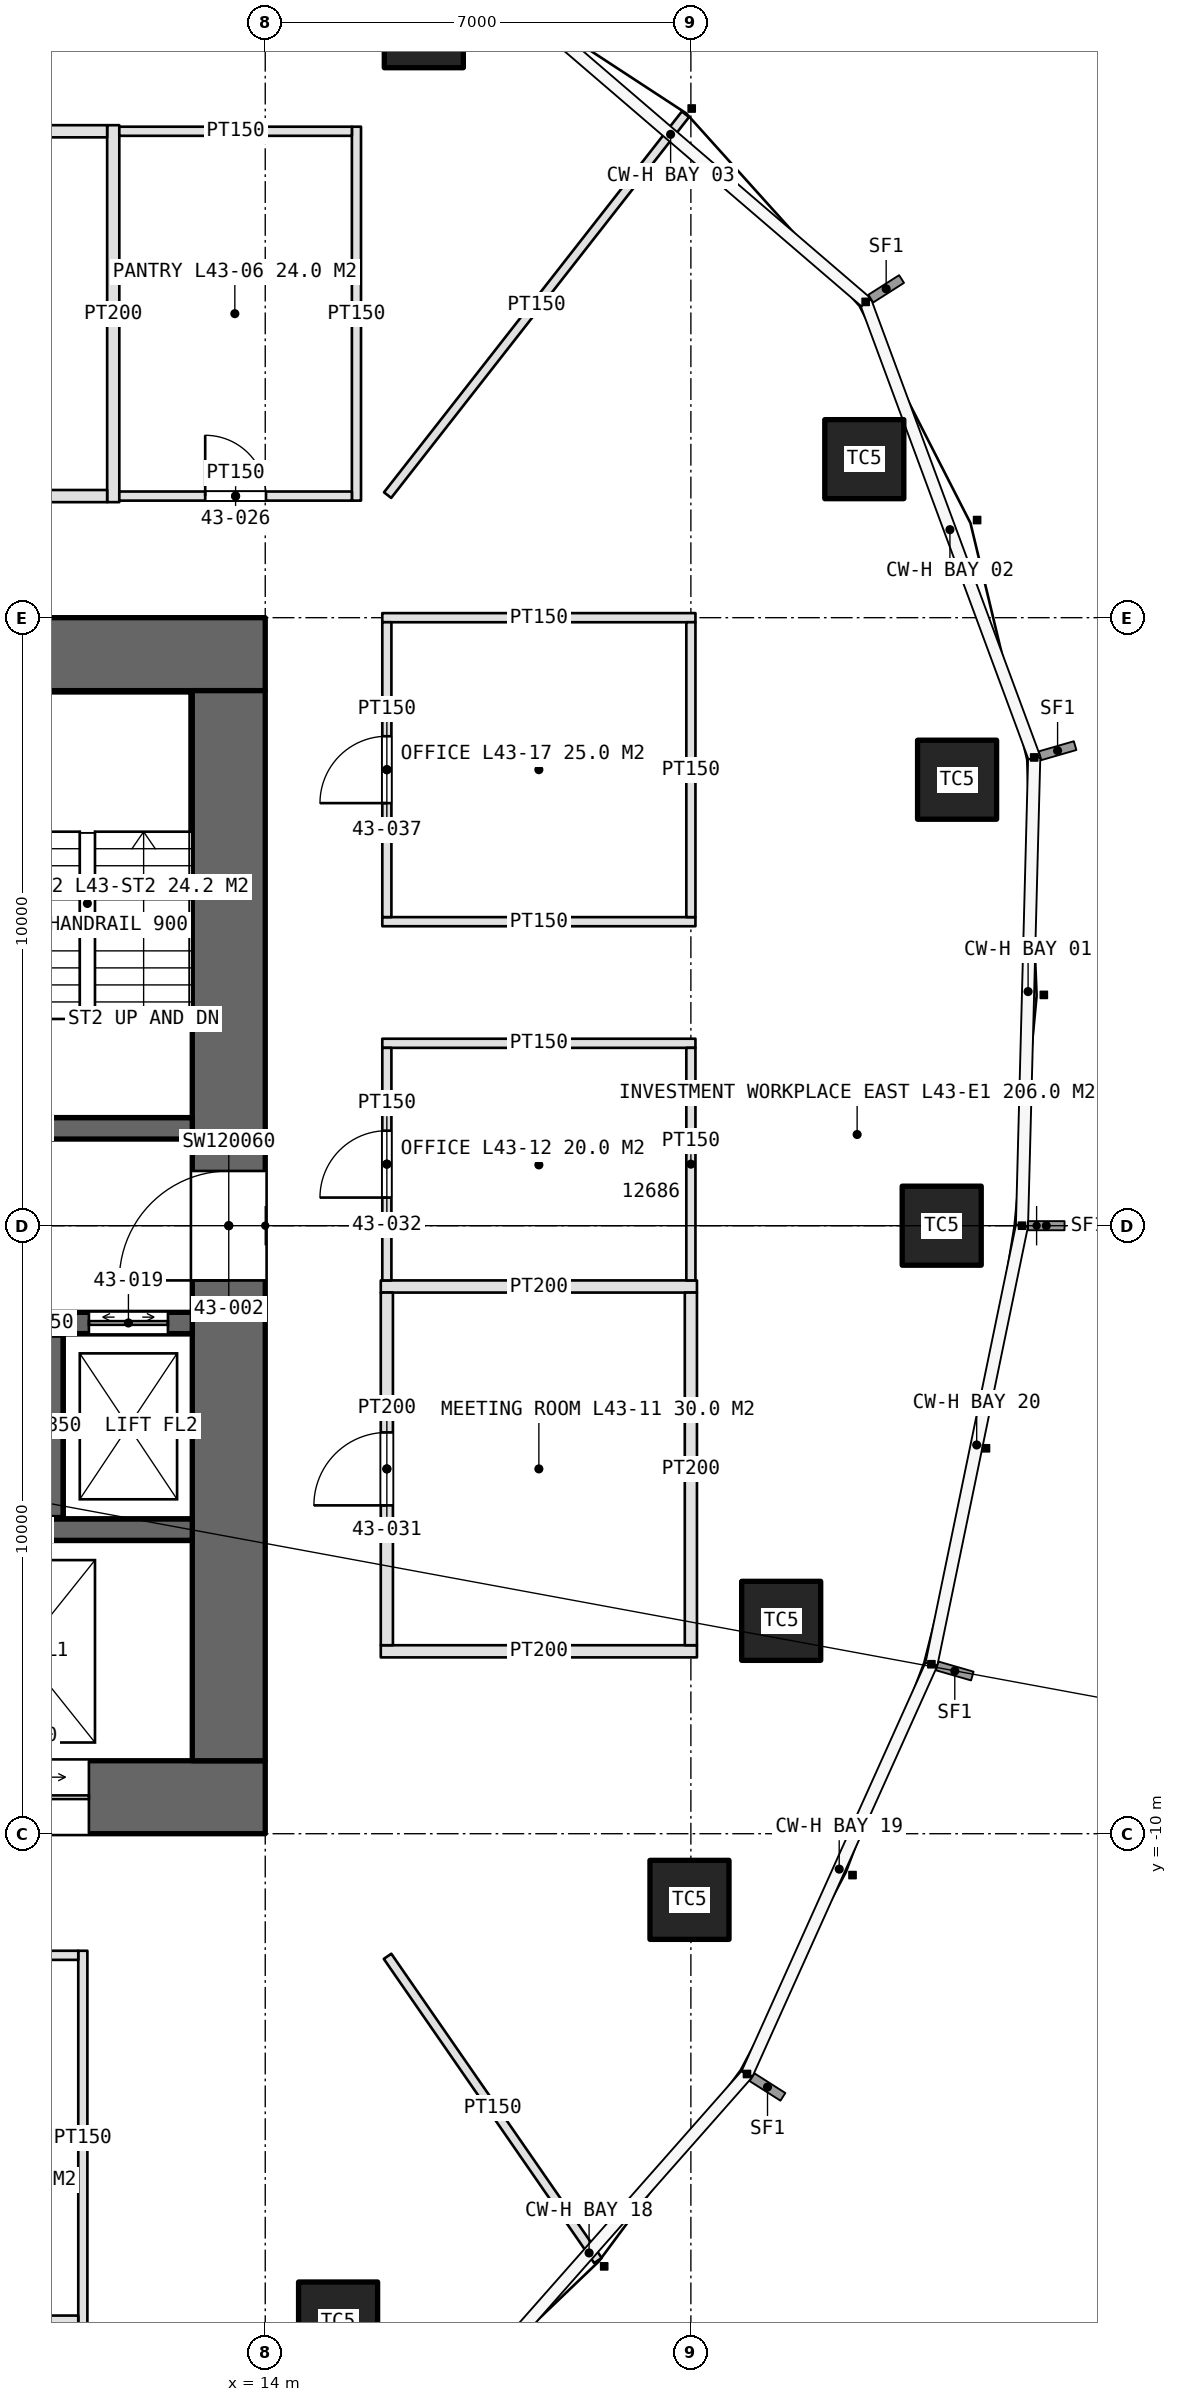
"""IFC4 building model, lengths in metres.
Left out: names, types, materials, properties, quantities, classifications, styles, units other than length and angle.
Written with IfcOpenShell. Run it as: python <this file> out.ifc"""

import sys

from ifc_helpers import new_model, si_unit, direction, frame, frame_2d, origin, origin_2d, place, context, subcontext, project, spatial, rectangle, extrude, element, fill, save


model = new_model("IFC4")
c1 = context("Model", 3, precision=1e-05, world=origin(), true_north=direction((0.0, 1.0)))
c2 = subcontext(c1, "Body", "Model", "MODEL_VIEW")
j1 = project(units=[si_unit("LENGTHUNIT", "METRE"), si_unit("PLANEANGLEUNIT", "RADIAN")], contexts=[c1])
p1 = place(None, origin())
s1 = spatial("IfcSite", under=j1, at=p1, CompositionType="ELEMENT")
p2 = place(p1, origin())
s2 = spatial("IfcBuilding", under=s1, at=p2, CompositionType="ELEMENT")
p3 = place(p2, frame((0.0, 0.0, 199.0)))
s3 = spatial("IfcBuildingStorey", under=s2, at=p3, CompositionType="ELEMENT", Elevation=199.0)
p4 = place(p3, frame((-14.0, -9.4, 0.0), z_axis=(0.0, 0.0, 1.0), x_axis=(1.0, 0.0, 0.0)))
e1 = element("IfcWall", 1, at=p4, inside=s3, PredefinedType="SHEAR", context=c2, shape_type="SweptSolid", body=[
    extrude(rectangle(XDim=28.0, YDim=1.2, at=frame_2d((14.0, 0.0))), origin(), (0.0, 0.0, 1.0), 4.2),
])
p5 = place(p4, frame((22.9, 0.0, 0.0)))
e2 = element("IfcOpeningElement", 2, at=p5, cuts=e1, PredefinedType="OPENING", context=c2, shape_type="SweptSolid", body=[
    extrude(rectangle(XDim=2.2, YDim=2.7, at=frame_2d((1.1, 1.35))), frame((0.0, 0.61, 0.0), z_axis=(0.0, -1.0, 0.0), x_axis=(1.0, 0.0, 0.0)), (0.0, 0.0, 1.0), 1.22),
])
p6 = place(p3, frame((14.0, 9.4, 0.0), z_axis=(0.0, 0.0, 1.0), x_axis=(-1.0, 0.0, 0.0)))
e3 = element("IfcWall", 3, at=p6, inside=s3, PredefinedType="SHEAR", context=c2, shape_type="SweptSolid", body=[
    extrude(rectangle(XDim=28.0, YDim=1.2, at=frame_2d((14.0, 0.0))), origin(), (0.0, 0.0, 1.0), 4.2),
])
p7 = place(p6, frame((24.0, 0.0, 0.0)))
e4 = element("IfcOpeningElement", 4, at=p7, cuts=e3, PredefinedType="OPENING", context=c2, shape_type="SweptSolid", body=[
    extrude(rectangle(XDim=1.0, YDim=2.4, at=frame_2d((0.5, 1.2))), frame((0.0, 0.61, 0.0), z_axis=(0.0, -1.0, 0.0), x_axis=(1.0, 0.0, 0.0)), (0.0, 0.0, 1.0), 1.22),
])
p8 = place(p3, frame((13.4, -8.8, 0.0), z_axis=(0.0, 0.0, 1.0), x_axis=(0.0, 1.0, 0.0)))
e5 = element("IfcWall", 5, at=p8, inside=s3, PredefinedType="SHEAR", context=c2, shape_type="SweptSolid", body=[
    extrude(rectangle(XDim=17.6, YDim=1.2, at=frame_2d((8.8, 0.0))), origin(), (0.0, 0.0, 1.0), 4.2),
])
p9 = place(p8, frame((7.9, 0.0, 0.0)))
e6 = element("IfcOpeningElement", 6, at=p9, cuts=e5, PredefinedType="OPENING", context=c2, shape_type="SweptSolid", body=[
    extrude(rectangle(XDim=1.8, YDim=2.4, at=frame_2d((0.9, 1.2))), frame((0.0, 0.61, 0.0), z_axis=(0.0, -1.0, 0.0), x_axis=(1.0, 0.0, 0.0)), (0.0, 0.0, 1.0), 1.22),
])
p10 = place(p3, frame((7.2, 1.6, 0.0), z_axis=(0.0, 0.0, 1.0), x_axis=(1.0, 0.0, 0.0)))
e7 = element("IfcWall", 7, at=p10, inside=s3, PredefinedType="SHEAR", context=c2, shape_type="SweptSolid", body=[
    extrude(rectangle(XDim=5.6, YDim=0.35, at=frame_2d((2.8, 0.0))), origin(), (0.0, 0.0, 1.0), 4.2),
])
p11 = place(p10, frame((0.6, 0.0, 0.0)))
e8 = element("IfcOpeningElement", 8, at=p11, cuts=e7, PredefinedType="OPENING", context=c2, shape_type="SweptSolid", body=[
    extrude(rectangle(XDim=1.0, YDim=2.4, at=frame_2d((0.5, 1.2))), frame((0.0, 0.185, 0.0), z_axis=(0.0, -1.0, 0.0), x_axis=(1.0, 0.0, 0.0)), (0.0, 0.0, 1.0), 0.37),
])
p12 = place(p3, frame((7.2, -1.6, 0.0), z_axis=(0.0, 0.0, 1.0), x_axis=(1.0, 0.0, 0.0)))
e9 = element("IfcWall", 9, at=p12, inside=s3, PredefinedType="SHEAR", context=c2, shape_type="SweptSolid", body=[
    extrude(rectangle(XDim=5.6, YDim=0.35, at=frame_2d((2.8, 0.0))), origin(), (0.0, 0.0, 1.0), 4.2),
])
p13 = place(p12, frame((0.9, 0.0, 0.0)))
e10 = element("IfcOpeningElement", 10, at=p13, cuts=e9, PredefinedType="OPENING", context=c2, shape_type="SweptSolid", body=[
    extrude(rectangle(XDim=1.3, YDim=2.4, at=frame_2d((0.65, 1.2))), frame((0.0, 0.185, 0.0), z_axis=(0.0, -1.0, 0.0), x_axis=(1.0, 0.0, 0.0)), (0.0, 0.0, 1.0), 0.37),
])
p14 = place(p12, frame((3.9, 0.0, 0.0)))
e11 = element("IfcOpeningElement", 11, at=p14, cuts=e9, PredefinedType="OPENING", context=c2, shape_type="SweptSolid", body=[
    extrude(rectangle(XDim=1.3, YDim=2.4, at=frame_2d((0.65, 1.2))), frame((0.0, 0.185, 0.0), z_axis=(0.0, -1.0, 0.0), x_axis=(1.0, 0.0, 0.0)), (0.0, 0.0, 1.0), 0.37),
])
p15 = place(p3, frame((10.5, -4.8, 0.0), z_axis=(0.0, 0.0, 1.0), x_axis=(0.0, 1.0, 0.0)))
e12 = element("IfcWall", 12, at=p15, inside=s3, PredefinedType="SHEAR", context=c2, shape_type="SweptSolid", body=[
    extrude(rectangle(XDim=3.0, YDim=0.35, at=frame_2d((1.5, 0.0))), origin(), (0.0, 0.0, 1.0), 4.2),
])
p16 = place(p3, frame((7.2, -5.0, 0.0), z_axis=(0.0, 0.0, 1.0), x_axis=(1.0, 0.0, 0.0)))
e13 = element("IfcWall", 13, at=p16, inside=s3, PredefinedType="SHEAR", context=c2, shape_type="SweptSolid", body=[
    extrude(rectangle(XDim=5.6, YDim=0.35, at=frame_2d((2.8, 0.0))), origin(), (0.0, 0.0, 1.0), 4.2),
])
for number, where, z_axis, x_axis in (
    (14, (25.125, 0.0, 0.0), (0.0, 0.0, 1.0), (1.0, 0.0, 0.0)),
    (15, (25.378, 7.335, 0.0), (0.0, 0.0, 1.0), (1.0, 0.0, 0.0)),
    (16, (23.852, 12.607, 0.0), (0.0, 0.0, 1.0), (1.0, 0.0, 0.0)),
    (17, (16.608, 19.695, 0.0), (0.0, 0.0, 1.0), (1.0, 0.0, 0.0)),
    (18, (15.198, -18.023, 0.0), (0.0, 0.0, 1.0), (1.0, 0.0, 0.0)),
    (19, (20.977, -11.088, 0.0), (0.0, 0.0, 1.0), (1.0, 0.0, 0.0)),
    (20, (22.485, -6.499, 0.0), (0.0, 0.0, 1.0), (1.0, 0.0, 0.0)),
):
    element("IfcColumn", number, at=place(p3, frame(where, z_axis=z_axis, x_axis=x_axis)), inside=s3, PredefinedType="COLUMN", context=c2, shape_type="SweptSolid", body=[
        extrude(rectangle(XDim=1.3, YDim=1.3, at=origin_2d()), origin(), (0.0, 0.0, 1.0), 4.2),
    ])
p17 = place(p3, frame((11.5, 11.9, 0.0), z_axis=(0.0, 0.0, 1.0), x_axis=(0.0, 1.0, 0.0)))
e21 = element("IfcWall", 21, at=p17, inside=s3, PredefinedType="PARTITIONING", context=c2, shape_type="SweptSolid", body=[
    extrude(rectangle(XDim=6.2, YDim=0.2, at=frame_2d((3.1, 0.0))), origin(), (0.0, 0.0, 1.0), 3.0),
])
p18 = place(p3, frame((15.5, 11.925, 0.0), z_axis=(0.0, 0.0, 1.0), x_axis=(0.0, 1.0, 0.0)))
e22 = element("IfcWall", 22, at=p18, inside=s3, PredefinedType="PARTITIONING", context=c2, shape_type="SweptSolid", body=[
    extrude(rectangle(XDim=6.15, YDim=0.15, at=frame_2d((3.075, 0.0))), origin(), (0.0, 0.0, 1.0), 3.0),
])
p19 = place(p3, frame((2.6, 12.0, 0.0), z_axis=(0.0, 0.0, 1.0), x_axis=(1.0, 0.0, 0.0)))
e23 = element("IfcWall", 23, at=p19, inside=s3, PredefinedType="PARTITIONING", context=c2, shape_type="SweptSolid", body=[
    extrude(rectangle(XDim=8.8, YDim=0.2, at=frame_2d((4.4, 0.0))), origin(), (0.0, 0.0, 1.0), 3.0),
])
p20 = place(p19, frame((3.8, 0.0, 0.0)))
e24 = element("IfcOpeningElement", 24, at=p20, cuts=e23, PredefinedType="OPENING", context=c2, shape_type="SweptSolid", body=[
    extrude(rectangle(XDim=1.2, YDim=2.4, at=frame_2d((0.6, 1.2))), frame((0.0, 0.11, 0.0), z_axis=(0.0, -1.0, 0.0), x_axis=(1.0, 0.0, 0.0)), (0.0, 0.0, 1.0), 0.22),
])
p21 = place(p3, frame((2.6, 18.0, 0.0), z_axis=(0.0, 0.0, 1.0), x_axis=(1.0, 0.0, 0.0)))
e25 = element("IfcWall", 25, at=p21, inside=s3, PredefinedType="PARTITIONING", context=c2, shape_type="SweptSolid", body=[
    extrude(rectangle(XDim=8.8, YDim=0.2, at=frame_2d((4.4, 0.0))), origin(), (0.0, 0.0, 1.0), 3.0),
])
p22 = place(p3, frame((11.6, 12.0, 0.0), z_axis=(0.0, 0.0, 1.0), x_axis=(1.0, 0.0, 0.0)))
e26 = element("IfcWall", 26, at=p22, inside=s3, PredefinedType="PARTITIONING", context=c2, shape_type="SweptSolid", body=[
    extrude(rectangle(XDim=3.825, YDim=0.15, at=frame_2d((1.913, 0.0))), origin(), (0.0, 0.0, 1.0), 3.0),
])
p23 = place(p22, frame((1.413, 0.0, 0.0)))
e27 = element("IfcOpeningElement", 27, at=p23, cuts=e26, PredefinedType="OPENING", context=c2, shape_type="SweptSolid", body=[
    extrude(rectangle(XDim=1.0, YDim=2.2, at=frame_2d((0.5, 1.1))), frame((0.0, 0.085, 0.0), z_axis=(0.0, -1.0, 0.0), x_axis=(1.0, 0.0, 0.0)), (0.0, 0.0, 1.0), 0.17),
])
p24 = place(p3, frame((11.6, 18.0, 0.0), z_axis=(0.0, 0.0, 1.0), x_axis=(1.0, 0.0, 0.0)))
e28 = element("IfcWall", 28, at=p24, inside=s3, PredefinedType="PARTITIONING", context=c2, shape_type="SweptSolid", body=[
    extrude(rectangle(XDim=3.825, YDim=0.15, at=frame_2d((1.913, 0.0))), origin(), (0.0, 0.0, 1.0), 3.0),
])
p25 = place(p3, frame((11.0, -11.925, 0.0), z_axis=(0.0, 0.0, 1.0), x_axis=(0.0, -1.0, 0.0)))
e29 = element("IfcWall", 29, at=p25, inside=s3, PredefinedType="PARTITIONING", context=c2, shape_type="SweptSolid", body=[
    extrude(rectangle(XDim=6.15, YDim=0.15, at=frame_2d((3.075, 0.0))), origin(), (0.0, 0.0, 1.0), 3.0),
])
p26 = place(p3, frame((6.075, -12.0, 0.0), z_axis=(0.0, 0.0, 1.0), x_axis=(1.0, 0.0, 0.0)))
e30 = element("IfcWall", 30, at=p26, inside=s3, PredefinedType="PARTITIONING", context=c2, shape_type="SweptSolid", body=[
    extrude(rectangle(XDim=4.85, YDim=0.15, at=frame_2d((2.425, 0.0))), origin(), (0.0, 0.0, 1.0), 3.0),
])
p27 = place(p26, frame((1.925, 0.0, 0.0)))
e31 = element("IfcOpeningElement", 31, at=p27, cuts=e30, PredefinedType="OPENING", context=c2, shape_type="SweptSolid", body=[
    extrude(rectangle(XDim=1.0, YDim=2.2, at=frame_2d((0.5, 1.1))), frame((0.0, 0.085, 0.0), z_axis=(0.0, -1.0, 0.0), x_axis=(1.0, 0.0, 0.0)), (0.0, 0.0, 1.0), 0.17),
])
p28 = place(p3, frame((6.075, -18.0, 0.0), z_axis=(0.0, 0.0, 1.0), x_axis=(1.0, 0.0, 0.0)))
e32 = element("IfcWall", 32, at=p28, inside=s3, PredefinedType="PARTITIONING", context=c2, shape_type="SweptSolid", body=[
    extrude(rectangle(XDim=4.85, YDim=0.15, at=frame_2d((2.425, 0.0))), origin(), (0.0, 0.0, 1.0), 3.0),
])
for number, where, z_axis, x_axis in (
    (33, (15.9, -7.0, 0.0), (0.0, 0.0, 1.0), (1.0, 0.0, 0.0)),
    (34, (15.9, -1.0, 0.0), (0.0, 0.0, 1.0), (1.0, 0.0, 0.0)),
):
    element("IfcWall", number, at=place(p3, frame(where, z_axis=z_axis, x_axis=x_axis)), inside=s3, PredefinedType="PARTITIONING", context=c2, shape_type="SweptSolid", body=[
        extrude(rectangle(XDim=5.2, YDim=0.2, at=frame_2d((2.6, 0.0))), origin(), (0.0, 0.0, 1.0), 3.0),
    ])
p29 = place(p3, frame((15.925, 3.0, 0.0), z_axis=(0.0, 0.0, 1.0), x_axis=(1.0, 0.0, 0.0)))
e35 = element("IfcWall", 35, at=p29, inside=s3, PredefinedType="PARTITIONING", context=c2, shape_type="SweptSolid", body=[
    extrude(rectangle(XDim=5.15, YDim=0.15, at=frame_2d((2.575, 0.0))), origin(), (0.0, 0.0, 1.0), 3.0),
])
p30 = place(p3, frame((16.0, -6.9, 0.0), z_axis=(0.0, 0.0, 1.0), x_axis=(0.0, 1.0, 0.0)))
e36 = element("IfcWall", 36, at=p30, inside=s3, PredefinedType="PARTITIONING", context=c2, shape_type="SweptSolid", body=[
    extrude(rectangle(XDim=5.8, YDim=0.2, at=frame_2d((2.9, 0.0))), origin(), (0.0, 0.0, 1.0), 3.0),
])
p31 = place(p30, frame((2.3, 0.0, 0.0)))
e37 = element("IfcOpeningElement", 37, at=p31, cuts=e36, PredefinedType="OPENING", context=c2, shape_type="SweptSolid", body=[
    extrude(rectangle(XDim=1.2, YDim=2.4, at=frame_2d((0.6, 1.2))), frame((0.0, 0.11, 0.0), z_axis=(0.0, -1.0, 0.0), x_axis=(1.0, 0.0, 0.0)), (0.0, 0.0, 1.0), 0.22),
])
p32 = place(p3, frame((21.0, -6.9, 0.0), z_axis=(0.0, 0.0, 1.0), x_axis=(0.0, 1.0, 0.0)))
e38 = element("IfcWall", 38, at=p32, inside=s3, PredefinedType="PARTITIONING", context=c2, shape_type="SweptSolid", body=[
    extrude(rectangle(XDim=5.8, YDim=0.2, at=frame_2d((2.9, 0.0))), origin(), (0.0, 0.0, 1.0), 3.0),
])
p33 = place(p3, frame((16.0, -0.9, 0.0), z_axis=(0.0, 0.0, 1.0), x_axis=(0.0, 1.0, 0.0)))
e39 = element("IfcWall", 39, at=p33, inside=s3, PredefinedType="PARTITIONING", context=c2, shape_type="SweptSolid", body=[
    extrude(rectangle(XDim=3.825, YDim=0.15, at=frame_2d((1.913, 0.0))), origin(), (0.0, 0.0, 1.0), 3.0),
])
p34 = place(p33, frame((1.363, 0.0, 0.0)))
e40 = element("IfcOpeningElement", 40, at=p34, cuts=e39, PredefinedType="OPENING", context=c2, shape_type="SweptSolid", body=[
    extrude(rectangle(XDim=1.1, YDim=2.3, at=frame_2d((0.55, 1.15))), frame((0.0, 0.085, 0.0), z_axis=(0.0, -1.0, 0.0), x_axis=(1.0, 0.0, 0.0)), (0.0, 0.0, 1.0), 0.17),
])
p35 = place(p3, frame((21.0, -0.9, 0.0), z_axis=(0.0, 0.0, 1.0), x_axis=(0.0, 1.0, 0.0)))
e41 = element("IfcWall", 41, at=p35, inside=s3, PredefinedType="PARTITIONING", context=c2, shape_type="SweptSolid", body=[
    extrude(rectangle(XDim=3.825, YDim=0.15, at=frame_2d((1.913, 0.0))), origin(), (0.0, 0.0, 1.0), 3.0),
])
for number, where, z_axis, x_axis in (
    (42, (15.925, 5.0, 0.0), (0.0, 0.0, 1.0), (1.0, 0.0, 0.0)),
    (43, (15.925, 10.0, 0.0), (0.0, 0.0, 1.0), (1.0, 0.0, 0.0)),
):
    element("IfcWall", number, at=place(p3, frame(where, z_axis=z_axis, x_axis=x_axis)), inside=s3, PredefinedType="PARTITIONING", context=c2, shape_type="SweptSolid", body=[
        extrude(rectangle(XDim=5.15, YDim=0.15, at=frame_2d((2.575, 0.0))), origin(), (0.0, 0.0, 1.0), 3.0),
    ])
p36 = place(p3, frame((16.0, 5.075, 0.0), z_axis=(0.0, 0.0, 1.0), x_axis=(0.0, 1.0, 0.0)))
e44 = element("IfcWall", 44, at=p36, inside=s3, PredefinedType="PARTITIONING", context=c2, shape_type="SweptSolid", body=[
    extrude(rectangle(XDim=4.85, YDim=0.15, at=frame_2d((2.425, 0.0))), origin(), (0.0, 0.0, 1.0), 3.0),
])
p37 = place(p36, frame((1.875, 0.0, 0.0)))
e45 = element("IfcOpeningElement", 45, at=p37, cuts=e44, PredefinedType="OPENING", context=c2, shape_type="SweptSolid", body=[
    extrude(rectangle(XDim=1.1, YDim=2.3, at=frame_2d((0.55, 1.15))), frame((0.0, 0.085, 0.0), z_axis=(0.0, -1.0, 0.0), x_axis=(1.0, 0.0, 0.0)), (0.0, 0.0, 1.0), 0.17),
])
p38 = place(p3, frame((21.0, 5.075, 0.0), z_axis=(0.0, 0.0, 1.0), x_axis=(0.0, 1.0, 0.0)))
e46 = element("IfcWall", 46, at=p38, inside=s3, PredefinedType="PARTITIONING", context=c2, shape_type="SweptSolid", body=[
    extrude(rectangle(XDim=4.85, YDim=0.15, at=frame_2d((2.425, 0.0))), origin(), (0.0, 0.0, 1.0), 3.0),
])
p39 = place(p3, frame((16.011, -12.016, 0.0), z_axis=(0.0, 0.0, 1.0), x_axis=(0.568863489071, -0.822431961199, 0.0)))
e47 = element("IfcWall", 47, at=p39, inside=s3, PredefinedType="PARTITIONING", context=c2, shape_type="SweptSolid", body=[
    extrude(rectangle(XDim=6.083, YDim=0.15, at=frame_2d((3.042, 0.0))), origin(), (0.0, 0.0, 1.0), 3.0),
])
p40 = place(p3, frame((16.012, 12.016, 0.0), z_axis=(0.0, 0.0, 1.0), x_axis=(0.616030058222, 0.787722646219, 0.0)))
e48 = element("IfcWall", 48, at=p40, inside=s3, PredefinedType="PARTITIONING", context=c2, shape_type="SweptSolid", body=[
    extrude(rectangle(XDim=7.952, YDim=0.15, at=frame_2d((3.976, 0.0))), origin(), (0.0, 0.0, 1.0), 3.0),
])
p41 = place(p9, origin())
e49 = element("IfcDoor", 49, at=p41, inside=s3, OperationType="DOUBLE_DOOR_SINGLE_SWING", PredefinedType="DOOR", context=c2, shape_type="SweptSolid", body=[
    extrude(rectangle(XDim=1.8, YDim=2.4, at=frame_2d((0.9, 1.2))), frame((0.0, 0.025, 0.0), z_axis=(0.0, -1.0, 0.0), x_axis=(1.0, 0.0, 0.0)), (0.0, 0.0, 1.0), 0.05),
])
fill(e6, e49)
p42 = place(p14, origin())
e50 = element("IfcDoor", 50, at=p42, inside=s3, OperationType="DOUBLE_DOOR_SLIDING", PredefinedType="DOOR", context=c2, shape_type="SweptSolid", body=[
    extrude(rectangle(XDim=1.3, YDim=2.4, at=frame_2d((0.65, 1.2))), frame((0.0, 0.025, 0.0), z_axis=(0.0, -1.0, 0.0), x_axis=(1.0, 0.0, 0.0)), (0.0, 0.0, 1.0), 0.05),
])
fill(e11, e50)
p43 = place(p5, origin())
e51 = element("IfcDoor", 51, at=p43, inside=s3, OperationType="DOUBLE_DOOR_SLIDING", PredefinedType="DOOR", context=c2, shape_type="SweptSolid", body=[
    extrude(rectangle(XDim=2.2, YDim=2.7, at=frame_2d((1.1, 1.35))), frame((0.0, 0.025, 0.0), z_axis=(0.0, -1.0, 0.0), x_axis=(1.0, 0.0, 0.0)), (0.0, 0.0, 1.0), 0.05),
])
fill(e2, e51)
p44 = place(p23, origin())
e52 = element("IfcDoor", 52, at=p44, inside=s3, OperationType="SINGLE_SWING_LEFT", PredefinedType="DOOR", context=c2, shape_type="SweptSolid", body=[
    extrude(rectangle(XDim=1.0, YDim=2.2, at=frame_2d((0.5, 1.1))), frame((0.0, 0.025, 0.0), z_axis=(0.0, -1.0, 0.0), x_axis=(1.0, 0.0, 0.0)), (0.0, 0.0, 1.0), 0.05),
])
fill(e27, e52)
p45 = place(p31, origin())
e53 = element("IfcDoor", 53, at=p45, inside=s3, OperationType="SINGLE_SWING_LEFT", PredefinedType="DOOR", context=c2, shape_type="SweptSolid", body=[
    extrude(rectangle(XDim=1.2, YDim=2.4, at=frame_2d((0.6, 1.2))), frame((0.0, 0.025, 0.0), z_axis=(0.0, -1.0, 0.0), x_axis=(1.0, 0.0, 0.0)), (0.0, 0.0, 1.0), 0.05),
])
fill(e37, e53)
p46 = place(p34, origin())
e54 = element("IfcDoor", 54, at=p46, inside=s3, OperationType="SINGLE_SWING_LEFT", PredefinedType="DOOR", context=c2, shape_type="SweptSolid", body=[
    extrude(rectangle(XDim=1.1, YDim=2.3, at=frame_2d((0.55, 1.15))), frame((0.0, 0.025, 0.0), z_axis=(0.0, -1.0, 0.0), x_axis=(1.0, 0.0, 0.0)), (0.0, 0.0, 1.0), 0.05),
])
fill(e40, e54)
p47 = place(p37, origin())
e55 = element("IfcDoor", 55, at=p47, inside=s3, OperationType="SINGLE_SWING_LEFT", PredefinedType="DOOR", context=c2, shape_type="SweptSolid", body=[
    extrude(rectangle(XDim=1.1, YDim=2.3, at=frame_2d((0.55, 1.15))), frame((0.0, 0.025, 0.0), z_axis=(0.0, -1.0, 0.0), x_axis=(1.0, 0.0, 0.0)), (0.0, 0.0, 1.0), 0.05),
])
fill(e45, e55)
save(model, sys.argv[1])
